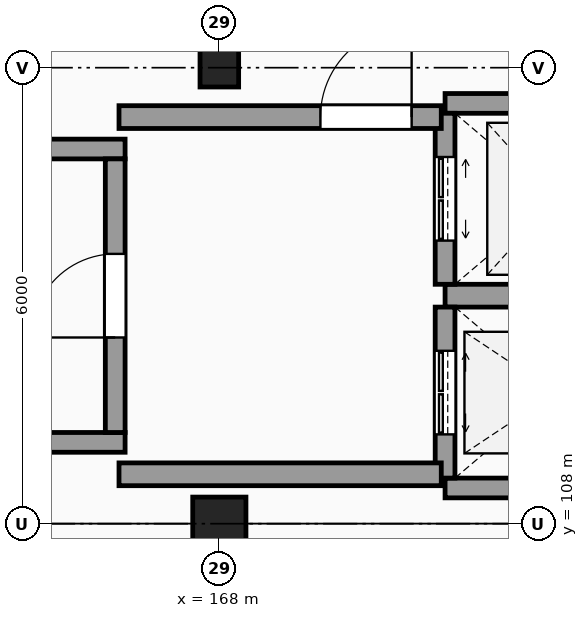
"""IFC4 building model, lengths in metres.
Left out: names, types, materials, properties, quantities, classifications, styles, units other than length and angle.
Written with IfcOpenShell. Run it as: python <this file> out.ifc"""

import sys

from ifc_helpers import new_model, si_unit, direction, frame, frame_2d, origin, origin_2d, place, context, subcontext, project, spatial, rectangle, circle, hollow_circle, extrude, element, fill, save


model = new_model("IFC4")
c1 = context("Model", 3, precision=1e-05, world=origin(), true_north=direction((0.0, 1.0)))
c2 = subcontext(c1, "Body", "Model", "MODEL_VIEW")
j1 = project(units=[si_unit("LENGTHUNIT", "METRE"), si_unit("PLANEANGLEUNIT", "RADIAN")], contexts=[c1])
p1 = place(None, origin())
s1 = spatial("IfcSite", under=j1, at=p1, CompositionType="ELEMENT")
p2 = place(p1, origin())
s2 = spatial("IfcBuilding", under=s1, at=p2, CompositionType="ELEMENT")
p3 = place(p2, frame((0.0, 0.0, 10.5)))
s3 = spatial("IfcBuildingStorey", under=s2, at=p3, CompositionType="ELEMENT", Elevation=10.5)
p4 = place(p3, frame((168.0, 108.0, 0.0), z_axis=(0.0, 0.0, 1.0), x_axis=(1.0, 0.0, 0.0)))
e1 = element("IfcColumn", 1, at=p4, inside=s3, PredefinedType="COLUMN", context=c2, shape_type="SweptSolid", body=[
    extrude(circle(Radius=0.35, at=origin_2d()), origin(), (0.0, 0.0, 1.0), 4.5),
])
p5 = place(p3, frame((168.0, 114.0, 0.0), z_axis=(0.0, 0.0, 1.0), x_axis=(1.0, 0.0, 0.0)))
e2 = element("IfcColumn", 2, at=p5, inside=s3, PredefinedType="COLUMN", context=c2, shape_type="SweptSolid", body=[
    extrude(hollow_circle(Radius=0.254, WallThickness=0.025, at=origin_2d()), origin(), (0.0, 0.0, 1.0), 4.5),
])
for number, where, z_axis, x_axis in (
    (3, (156.04, 109.07, 0.0), (0.0, 0.0, 1.0), (1.0, 0.0, 0.0)),
    (4, (156.04, 112.93, 0.0), (0.0, 0.0, 1.0), (1.0, 0.0, 0.0)),
):
    element("IfcWall", number, at=place(p3, frame(where, z_axis=z_axis, x_axis=x_axis)), inside=s3, PredefinedType="SHEAR", context=c2, shape_type="SweptSolid", body=[
        extrude(rectangle(XDim=10.72, YDim=0.26, at=frame_2d((5.36, 0.0))), origin(), (0.0, 0.0, 1.0), 4.5),
    ])
p6 = place(p3, frame((166.63, 109.2, 0.0), z_axis=(0.0, 0.0, 1.0), x_axis=(0.0, 1.0, 0.0)))
e5 = element("IfcWall", 5, at=p6, inside=s3, PredefinedType="SHEAR", context=c2, shape_type="SweptSolid", body=[
    extrude(rectangle(XDim=3.6, YDim=0.26, at=frame_2d((1.8, 0.0))), origin(), (0.0, 0.0, 1.0), 4.5),
])
p7 = place(p6, frame((1.25, 0.0, 0.0)))
e6 = element("IfcOpeningElement", 6, at=p7, cuts=e5, PredefinedType="OPENING", context=c2, shape_type="SweptSolid", body=[
    extrude(rectangle(XDim=1.1, YDim=2.15, at=frame_2d((0.55, 1.075))), frame((0.0, 0.14, 0.0), z_axis=(0.0, -1.0, 0.0), x_axis=(1.0, 0.0, 0.0)), (0.0, 0.0, 1.0), 0.28),
])
p8 = place(p3, frame((170.97, 108.47, 0.0), z_axis=(0.0, 0.0, 1.0), x_axis=(1.0, 0.0, 0.0)))
e7 = element("IfcWall", 7, at=p8, inside=s3, PredefinedType="SHEAR", context=c2, shape_type="SweptSolid", body=[
    extrude(rectangle(XDim=2.91, YDim=0.26, at=frame_2d((1.455, 0.0))), origin(), (0.0, 0.0, 1.0), 4.5),
])
p9 = place(p3, frame((170.97, 111.0, 0.0), z_axis=(0.0, 0.0, 1.0), x_axis=(1.0, 0.0, 0.0)))
e8 = element("IfcWall", 8, at=p9, inside=s3, PredefinedType="SHEAR", context=c2, shape_type="SweptSolid", body=[
    extrude(rectangle(XDim=2.91, YDim=0.3, at=frame_2d((1.455, 0.0))), origin(), (0.0, 0.0, 1.0), 4.5),
])
p10 = place(p3, frame((170.97, 108.6, 0.0), z_axis=(0.0, 0.0, 1.0), x_axis=(0.0, 1.0, 0.0)))
e9 = element("IfcWall", 9, at=p10, inside=s3, PredefinedType="SHEAR", context=c2, shape_type="SweptSolid", body=[
    extrude(rectangle(XDim=2.25, YDim=0.26, at=frame_2d((1.125, 0.0))), origin(), (0.0, 0.0, 1.0), 4.5),
])
p11 = place(p10, frame((0.575, 0.0, 0.0)))
e10 = element("IfcOpeningElement", 10, at=p11, cuts=e9, PredefinedType="OPENING", context=c2, shape_type="SweptSolid", body=[
    extrude(rectangle(XDim=1.1, YDim=2.2, at=frame_2d((0.55, 1.1))), frame((0.0, 0.14, 0.0), z_axis=(0.0, -1.0, 0.0), x_axis=(1.0, 0.0, 0.0)), (0.0, 0.0, 1.0), 0.28),
])
p12 = place(p3, frame((170.97, 113.53, 0.0), z_axis=(0.0, 0.0, 1.0), x_axis=(1.0, 0.0, 0.0)))
e11 = element("IfcWall", 11, at=p12, inside=s3, PredefinedType="SHEAR", context=c2, shape_type="SweptSolid", body=[
    extrude(rectangle(XDim=2.91, YDim=0.26, at=frame_2d((1.455, 0.0))), origin(), (0.0, 0.0, 1.0), 4.5),
])
p13 = place(p3, frame((170.97, 111.15, 0.0), z_axis=(0.0, 0.0, 1.0), x_axis=(0.0, 1.0, 0.0)))
e12 = element("IfcWall", 12, at=p13, inside=s3, PredefinedType="SHEAR", context=c2, shape_type="SweptSolid", body=[
    extrude(rectangle(XDim=2.25, YDim=0.26, at=frame_2d((1.125, 0.0))), origin(), (0.0, 0.0, 1.0), 4.5),
])
p14 = place(p13, frame((0.575, 0.0, 0.0)))
e13 = element("IfcOpeningElement", 13, at=p14, cuts=e12, PredefinedType="OPENING", context=c2, shape_type="SweptSolid", body=[
    extrude(rectangle(XDim=1.1, YDim=2.2, at=frame_2d((0.55, 1.1))), frame((0.0, 0.14, 0.0), z_axis=(0.0, -1.0, 0.0), x_axis=(1.0, 0.0, 0.0)), (0.0, 0.0, 1.0), 0.28),
])
p15 = place(p3, frame((166.68, 113.35, 0.0), z_axis=(0.0, 0.0, 1.0), x_axis=(1.0, 0.0, 0.0)))
e14 = element("IfcWall", 14, at=p15, inside=s3, PredefinedType="SHEAR", context=c2, shape_type="SweptSolid", body=[
    extrude(rectangle(XDim=4.24, YDim=0.3, at=frame_2d((2.12, 0.0))), origin(), (0.0, 0.0, 1.0), 4.5),
])
p16 = place(p15, frame((2.65, 0.0, 0.0)))
e15 = element("IfcOpeningElement", 15, at=p16, cuts=e14, PredefinedType="OPENING", context=c2, shape_type="SweptSolid", body=[
    extrude(rectangle(XDim=1.2, YDim=2.2, at=frame_2d((0.6, 1.1))), frame((0.0, 0.16, 0.0), z_axis=(0.0, -1.0, 0.0), x_axis=(1.0, 0.0, 0.0)), (0.0, 0.0, 1.0), 0.32),
])
p17 = place(p3, frame((166.68, 108.65, 0.0), z_axis=(0.0, 0.0, 1.0), x_axis=(1.0, 0.0, 0.0)))
e16 = element("IfcWall", 16, at=p17, inside=s3, PredefinedType="SHEAR", context=c2, shape_type="SweptSolid", body=[
    extrude(rectangle(XDim=4.24, YDim=0.3, at=frame_2d((2.12, 0.0))), origin(), (0.0, 0.0, 1.0), 4.5),
])
p18 = place(p7, origin())
e17 = element("IfcDoor", 17, at=p18, inside=s3, OperationType="SINGLE_SWING_LEFT", PredefinedType="DOOR", context=c2, shape_type="SweptSolid", body=[
    extrude(rectangle(XDim=1.1, YDim=2.15, at=frame_2d((0.55, 1.075))), frame((0.0, 0.025, 0.0), z_axis=(0.0, -1.0, 0.0), x_axis=(1.0, 0.0, 0.0)), (0.0, 0.0, 1.0), 0.05),
])
fill(e6, e17)
p19 = place(p11, origin())
e18 = element("IfcDoor", 18, at=p19, inside=s3, OperationType="DOUBLE_DOOR_SLIDING", PredefinedType="DOOR", context=c2, shape_type="SweptSolid", body=[
    extrude(rectangle(XDim=1.1, YDim=2.2, at=frame_2d((0.55, 1.1))), frame((0.0, 0.025, 0.0), z_axis=(0.0, -1.0, 0.0), x_axis=(1.0, 0.0, 0.0)), (0.0, 0.0, 1.0), 0.05),
])
fill(e10, e18)
p20 = place(p14, origin())
e19 = element("IfcDoor", 19, at=p20, inside=s3, OperationType="DOUBLE_DOOR_SLIDING", PredefinedType="DOOR", context=c2, shape_type="SweptSolid", body=[
    extrude(rectangle(XDim=1.1, YDim=2.2, at=frame_2d((0.55, 1.1))), frame((0.0, 0.025, 0.0), z_axis=(0.0, -1.0, 0.0), x_axis=(1.0, 0.0, 0.0)), (0.0, 0.0, 1.0), 0.05),
])
fill(e13, e19)
p21 = place(p16, origin())
e20 = element("IfcDoor", 20, at=p21, inside=s3, OperationType="SINGLE_SWING_RIGHT", PredefinedType="DOOR", context=c2, shape_type="SweptSolid", body=[
    extrude(rectangle(XDim=1.2, YDim=2.2, at=frame_2d((0.6, 1.1))), frame((0.0, 0.025, 0.0), z_axis=(0.0, -1.0, 0.0), x_axis=(1.0, 0.0, 0.0)), (0.0, 0.0, 1.0), 0.05),
])
fill(e15, e20)
save(model, sys.argv[1])
